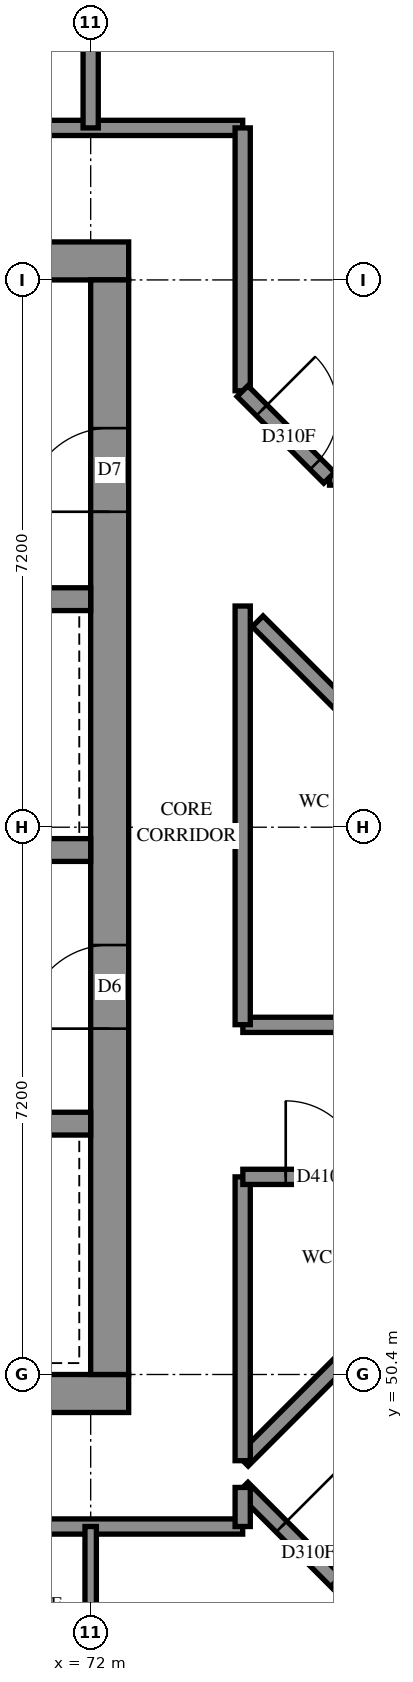
"""IFC4 building model, lengths in metres.
Left out: names, types, materials, properties, quantities, classifications, styles, units other than length and angle.
Written with IfcOpenShell. Run it as: python <this file> out.ifc"""

import sys

from ifc_helpers import new_model, si_unit, direction, frame, frame_2d, origin, place, context, subcontext, project, spatial, rectangle, extrude, element, fill, save


model = new_model("IFC4")
c1 = context("Model", 3, precision=1e-05, world=origin(), true_north=direction((0.0, 1.0)))
c2 = subcontext(c1, "Body", "Model", "MODEL_VIEW")
j1 = project(units=[si_unit("LENGTHUNIT", "METRE"), si_unit("PLANEANGLEUNIT", "RADIAN")], contexts=[c1])
p1 = place(None, origin())
s1 = spatial("IfcSite", under=j1, at=p1, CompositionType="ELEMENT")
p2 = place(p1, origin())
s2 = spatial("IfcBuilding", under=s1, at=p2, CompositionType="ELEMENT")
p3 = place(p2, frame((0.0, 0.0, 196.4)))
s3 = spatial("IfcBuildingStorey", under=s2, at=p3, CompositionType="ELEMENT", Elevation=196.4)
p4 = place(p3, frame((57.1, 50.15, -0.3), z_axis=(0.0, 0.0, 1.0), x_axis=(1.0, 0.0, 0.0)))
e1 = element("IfcWall", 1, at=p4, inside=s3, PredefinedType="SHEAR", context=c2, shape_type="SweptSolid", body=[
    extrude(rectangle(XDim=15.4, YDim=0.5, at=frame_2d((7.7, 0.0))), origin(), (0.0, 0.0, 1.0), 2.7),
])
p5 = place(p3, frame((57.1, 65.05, -0.3), z_axis=(0.0, 0.0, 1.0), x_axis=(1.0, 0.0, 0.0)))
e2 = element("IfcWall", 2, at=p5, inside=s3, PredefinedType="SHEAR", context=c2, shape_type="SweptSolid", body=[
    extrude(rectangle(XDim=15.4, YDim=0.5, at=frame_2d((7.7, 0.0))), origin(), (0.0, 0.0, 1.0), 2.7),
])
p6 = place(p5, frame((10.5, 0.0, 0.3)))
e3 = element("IfcOpeningElement", 3, at=p6, cuts=e2, PredefinedType="OPENING", context=c2, shape_type="SweptSolid", body=[
    extrude(rectangle(XDim=0.8, YDim=2.1, at=frame_2d((0.4, 1.05))), frame((0.0, 0.26, 0.0), z_axis=(0.0, -1.0, 0.0), x_axis=(1.0, 0.0, 0.0)), (0.0, 0.0, 1.0), 0.52),
])
p7 = place(p3, frame((72.25, 50.4, -0.3), z_axis=(0.0, 0.0, 1.0), x_axis=(0.0, 1.0, 0.0)))
e4 = element("IfcWall", 4, at=p7, inside=s3, PredefinedType="SHEAR", context=c2, shape_type="SweptSolid", body=[
    extrude(rectangle(XDim=14.4, YDim=0.5, at=frame_2d((7.2, 0.0))), origin(), (0.0, 0.0, 1.0), 2.7),
])
p8 = place(p7, frame((4.55, 0.0, 0.3)))
e5 = element("IfcOpeningElement", 5, at=p8, cuts=e4, PredefinedType="OPENING", context=c2, shape_type="SweptSolid", body=[
    extrude(rectangle(XDim=1.1, YDim=2.1, at=frame_2d((0.55, 1.05))), frame((0.0, 0.26, 0.0), z_axis=(0.0, -1.0, 0.0), x_axis=(1.0, 0.0, 0.0)), (0.0, 0.0, 1.0), 0.52),
])
p9 = place(p7, frame((11.35, 0.0, 0.3)))
e6 = element("IfcOpeningElement", 6, at=p9, cuts=e4, PredefinedType="OPENING", context=c2, shape_type="SweptSolid", body=[
    extrude(rectangle(XDim=1.1, YDim=2.1, at=frame_2d((0.55, 1.05))), frame((0.0, 0.26, 0.0), z_axis=(0.0, -1.0, 0.0), x_axis=(1.0, 0.0, 0.0)), (0.0, 0.0, 1.0), 0.52),
])
p10 = place(p3, frame((57.6, 53.7, 0.0), z_axis=(0.0, 0.0, 1.0), x_axis=(1.0, 0.0, 0.0)))
e7 = element("IfcWall", 7, at=p10, inside=s3, PredefinedType="SOLIDWALL", context=c2, shape_type="SweptSolid", body=[
    extrude(rectangle(XDim=14.4, YDim=0.3, at=frame_2d((7.2, 0.0))), origin(), (0.0, 0.0, 1.0), 3.1),
])
p11 = place(p10, frame((1.35, 0.0, 0.0)))
e8 = element("IfcOpeningElement", 8, at=p11, cuts=e7, PredefinedType="OPENING", context=c2, shape_type="SweptSolid", body=[
    extrude(rectangle(XDim=0.9, YDim=2.1, at=frame_2d((0.45, 1.05))), frame((0.0, 0.16, 0.0), z_axis=(0.0, -1.0, 0.0), x_axis=(1.0, 0.0, 0.0)), (0.0, 0.0, 1.0), 0.32),
])
p12 = place(p10, frame((4.95, 0.0, 0.0)))
e9 = element("IfcOpeningElement", 9, at=p12, cuts=e7, PredefinedType="OPENING", context=c2, shape_type="SweptSolid", body=[
    extrude(rectangle(XDim=0.9, YDim=2.1, at=frame_2d((0.45, 1.05))), frame((0.0, 0.16, 0.0), z_axis=(0.0, -1.0, 0.0), x_axis=(1.0, 0.0, 0.0)), (0.0, 0.0, 1.0), 0.32),
])
p13 = place(p10, frame((8.55, 0.0, 0.0)))
e10 = element("IfcOpeningElement", 10, at=p13, cuts=e7, PredefinedType="OPENING", context=c2, shape_type="SweptSolid", body=[
    extrude(rectangle(XDim=0.9, YDim=2.1, at=frame_2d((0.45, 1.05))), frame((0.0, 0.16, 0.0), z_axis=(0.0, -1.0, 0.0), x_axis=(1.0, 0.0, 0.0)), (0.0, 0.0, 1.0), 0.32),
])
p14 = place(p10, frame((12.05, 0.0, 0.0)))
e11 = element("IfcOpeningElement", 11, at=p14, cuts=e7, PredefinedType="OPENING", context=c2, shape_type="SweptSolid", body=[
    extrude(rectangle(XDim=1.1, YDim=2.1, at=frame_2d((0.55, 1.05))), frame((0.0, 0.16, 0.0), z_axis=(0.0, -1.0, 0.0), x_axis=(1.0, 0.0, 0.0)), (0.0, 0.0, 1.0), 0.32),
])
p15 = place(p3, frame((57.6, 57.3, 0.0), z_axis=(0.0, 0.0, 1.0), x_axis=(1.0, 0.0, 0.0)))
e12 = element("IfcWall", 12, at=p15, inside=s3, PredefinedType="SOLIDWALL", context=c2, shape_type="SweptSolid", body=[
    extrude(rectangle(XDim=14.4, YDim=0.3, at=frame_2d((7.2, 0.0))), origin(), (0.0, 0.0, 1.0), 3.1),
])
p16 = place(p15, frame((1.25, 0.0, 0.0)))
e13 = element("IfcOpeningElement", 13, at=p16, cuts=e12, PredefinedType="OPENING", context=c2, shape_type="SweptSolid", body=[
    extrude(rectangle(XDim=1.1, YDim=2.1, at=frame_2d((0.55, 1.05))), frame((0.0, 0.16, 0.0), z_axis=(0.0, -1.0, 0.0), x_axis=(1.0, 0.0, 0.0)), (0.0, 0.0, 1.0), 0.32),
])
p17 = place(p15, frame((4.85, 0.0, 0.0)))
e14 = element("IfcOpeningElement", 14, at=p17, cuts=e12, PredefinedType="OPENING", context=c2, shape_type="SweptSolid", body=[
    extrude(rectangle(XDim=1.1, YDim=2.1, at=frame_2d((0.55, 1.05))), frame((0.0, 0.16, 0.0), z_axis=(0.0, -1.0, 0.0), x_axis=(1.0, 0.0, 0.0)), (0.0, 0.0, 1.0), 0.32),
])
p18 = place(p15, frame((8.45, 0.0, 0.0)))
e15 = element("IfcOpeningElement", 15, at=p18, cuts=e12, PredefinedType="OPENING", context=c2, shape_type="SweptSolid", body=[
    extrude(rectangle(XDim=1.1, YDim=2.1, at=frame_2d((0.55, 1.05))), frame((0.0, 0.16, 0.0), z_axis=(0.0, -1.0, 0.0), x_axis=(1.0, 0.0, 0.0)), (0.0, 0.0, 1.0), 0.32),
])
p19 = place(p15, frame((12.05, 0.0, 0.0)))
e16 = element("IfcOpeningElement", 16, at=p19, cuts=e12, PredefinedType="OPENING", context=c2, shape_type="SweptSolid", body=[
    extrude(rectangle(XDim=1.1, YDim=2.1, at=frame_2d((0.55, 1.05))), frame((0.0, 0.16, 0.0), z_axis=(0.0, -1.0, 0.0), x_axis=(1.0, 0.0, 0.0)), (0.0, 0.0, 1.0), 0.32),
])
p20 = place(p3, frame((64.8, 60.6, 0.0), z_axis=(0.0, 0.0, 1.0), x_axis=(1.0, 0.0, 0.0)))
e17 = element("IfcWall", 17, at=p20, inside=s3, PredefinedType="SOLIDWALL", context=c2, shape_type="SweptSolid", body=[
    extrude(rectangle(XDim=7.2, YDim=0.3, at=frame_2d((3.6, 0.0))), origin(), (0.0, 0.0, 1.0), 3.1),
])
p21 = place(p3, frame((55.6, 48.4, 0.0), z_axis=(0.0, 0.0, 1.0), x_axis=(1.0, 0.0, 0.0)))
e18 = element("IfcWall", 18, at=p21, inside=s3, PredefinedType="PARTITIONING", context=c2, shape_type="SweptSolid", body=[
    extrude(rectangle(XDim=18.4, YDim=0.2, at=frame_2d((9.2, 0.0))), origin(), (0.0, 0.0, 1.0), 3.1),
])
p22 = place(p21, frame((5.862, 0.0, 0.0)))
e19 = element("IfcOpeningElement", 19, at=p22, cuts=e18, PredefinedType="OPENING", context=c2, shape_type="SweptSolid", body=[
    extrude(rectangle(XDim=1.0, YDim=2.1, at=frame_2d((0.5, 1.05))), frame((0.0, 0.11, 0.0), z_axis=(0.0, -1.0, 0.0), x_axis=(1.0, 0.0, 0.0)), (0.0, 0.0, 1.0), 0.22),
])
p23 = place(p21, frame((11.5, 0.0, 0.0)))
e20 = element("IfcOpeningElement", 20, at=p23, cuts=e18, PredefinedType="OPENING", context=c2, shape_type="SweptSolid", body=[
    extrude(rectangle(XDim=0.9, YDim=2.1, at=frame_2d((0.45, 1.05))), frame((0.0, 0.11, 0.0), z_axis=(0.0, -1.0, 0.0), x_axis=(1.0, 0.0, 0.0)), (0.0, 0.0, 1.0), 0.22),
])
p24 = place(p21, frame((13.2, 0.0, 0.0)))
e21 = element("IfcOpeningElement", 21, at=p24, cuts=e18, PredefinedType="OPENING", context=c2, shape_type="SweptSolid", body=[
    extrude(rectangle(XDim=0.9, YDim=2.1, at=frame_2d((0.45, 1.05))), frame((0.0, 0.11, 0.0), z_axis=(0.0, -1.0, 0.0), x_axis=(1.0, 0.0, 0.0)), (0.0, 0.0, 1.0), 0.22),
])
p25 = place(p3, frame((55.6, 66.8, 0.0), z_axis=(0.0, 0.0, 1.0), x_axis=(1.0, 0.0, 0.0)))
e22 = element("IfcWall", 22, at=p25, inside=s3, PredefinedType="PARTITIONING", context=c2, shape_type="SweptSolid", body=[
    extrude(rectangle(XDim=18.4, YDim=0.2, at=frame_2d((9.2, 0.0))), origin(), (0.0, 0.0, 1.0), 3.1),
])
p26 = place(p25, frame((5.886, 0.0, 0.0)))
e23 = element("IfcOpeningElement", 23, at=p26, cuts=e22, PredefinedType="OPENING", context=c2, shape_type="SweptSolid", body=[
    extrude(rectangle(XDim=1.0, YDim=2.1, at=frame_2d((0.5, 1.05))), frame((0.0, 0.11, 0.0), z_axis=(0.0, -1.0, 0.0), x_axis=(1.0, 0.0, 0.0)), (0.0, 0.0, 1.0), 0.22),
])
p27 = place(p25, frame((13.389, 0.0, 0.0)))
e24 = element("IfcOpeningElement", 24, at=p27, cuts=e22, PredefinedType="OPENING", context=c2, shape_type="SweptSolid", body=[
    extrude(rectangle(XDim=1.0, YDim=2.1, at=frame_2d((0.5, 1.05))), frame((0.0, 0.11, 0.0), z_axis=(0.0, -1.0, 0.0), x_axis=(1.0, 0.0, 0.0)), (0.0, 0.0, 1.0), 0.22),
])
p28 = place(p3, frame((73.999, 48.911, 0.0), z_axis=(0.0, 0.0, 1.0), x_axis=(0.7071067812, -0.7071067812, 0.0)))
e25 = element("IfcWall", 25, at=p28, inside=s3, PredefinedType="PARTITIONING", context=c2, shape_type="SweptSolid", body=[
    extrude(rectangle(XDim=5.745, YDim=0.2, at=frame_2d((2.872, 0.0))), origin(), (0.0, 0.0, 1.0), 3.1),
])
p29 = place(p28, frame((0.724, 0.0, 0.0)))
e26 = element("IfcOpeningElement", 26, at=p29, cuts=e25, PredefinedType="OPENING", context=c2, shape_type="SweptSolid", body=[
    extrude(rectangle(XDim=1.0, YDim=2.1, at=frame_2d((0.5, 1.05))), frame((0.0, 0.11, 0.0), z_axis=(0.0, -1.0, 0.0), x_axis=(1.0, 0.0, 0.0)), (0.0, 0.0, 1.0), 0.22),
])
p30 = place(p3, frame((74.002, 55.0, 0.0), z_axis=(0.0, 0.0, 1.0), x_axis=(1.0, 0.0, 0.0)))
e27 = element("IfcWall", 27, at=p30, inside=s3, PredefinedType="PARTITIONING", context=c2, shape_type="SweptSolid", body=[
    extrude(rectangle(XDim=5.508, YDim=0.2, at=frame_2d((2.754, 0.0))), origin(), (0.0, 0.0, 1.0), 3.1),
])
p31 = place(p30, frame((1.51, 0.0, 0.0)))
e28 = element("IfcOpeningElement", 28, at=p31, cuts=e27, PredefinedType="OPENING", context=c2, shape_type="SweptSolid", body=[
    extrude(rectangle(XDim=1.0, YDim=2.1, at=frame_2d((0.5, 1.05))), frame((0.0, 0.11, 0.0), z_axis=(0.0, -1.0, 0.0), x_axis=(1.0, 0.0, 0.0)), (0.0, 0.0, 1.0), 0.22),
])
p32 = place(p3, frame((74.0, 55.002, 0.0), z_axis=(0.0, 0.0, 1.0), x_axis=(0.0, 1.0, 0.0)))
e29 = element("IfcWall", 29, at=p32, inside=s3, PredefinedType="PARTITIONING", context=c2, shape_type="SweptSolid", body=[
    extrude(rectangle(XDim=5.508, YDim=0.2, at=frame_2d((2.754, 0.0))), origin(), (0.0, 0.0, 1.0), 3.1),
])
p33 = place(p3, frame((74.001, 49.267, 0.0), z_axis=(0.0, 0.0, 1.0), x_axis=(0.7071067812, 0.7071067812, 0.0)))
e30 = element("IfcWall", 30, at=p33, inside=s3, PredefinedType="PARTITIONING", context=c2, shape_type="SweptSolid", body=[
    extrude(rectangle(XDim=5.278, YDim=0.2, at=frame_2d((2.639, 0.0))), origin(), (0.0, 0.0, 1.0), 3.1),
])
p34 = place(p3, frame((74.197, 60.309, 0.0), z_axis=(0.0, 0.0, 1.0), x_axis=(0.7071067812, -0.7071067812, 0.0)))
e31 = element("IfcWall", 31, at=p34, inside=s3, PredefinedType="PARTITIONING", context=c2, shape_type="SweptSolid", body=[
    extrude(rectangle(XDim=4.738, YDim=0.2, at=frame_2d((2.369, 0.0))), origin(), (0.0, 0.0, 1.0), 3.1),
])
p35 = place(p3, frame((72.0, 66.8, 0.0), z_axis=(0.0, 0.0, 1.0), x_axis=(0.0, 1.0, 0.0)))
e32 = element("IfcWall", 32, at=p35, inside=s3, PredefinedType="PARTITIONING", context=c2, shape_type="SweptSolid", body=[
    extrude(rectangle(XDim=4.696, YDim=0.2, at=frame_2d((2.348, 0.0))), origin(), (0.0, 0.0, 1.0), 3.1),
])
p36 = place(p3, frame((75.142, 62.2, 0.0), z_axis=(0.0, 0.0, 1.0), x_axis=(1.0, 0.0, 0.0)))
e33 = element("IfcWall", 33, at=p36, inside=s3, PredefinedType="PARTITIONING", context=c2, shape_type="SweptSolid", body=[
    extrude(rectangle(XDim=4.058, YDim=0.2, at=frame_2d((2.029, 0.0))), origin(), (0.0, 0.0, 1.0), 3.1),
])
p37 = place(p36, frame((2.808, 0.0, 0.0)))
e34 = element("IfcOpeningElement", 34, at=p37, cuts=e33, PredefinedType="OPENING", context=c2, shape_type="SweptSolid", body=[
    extrude(rectangle(XDim=0.9, YDim=2.1, at=frame_2d((0.45, 1.05))), frame((0.0, 0.11, 0.0), z_axis=(0.0, -1.0, 0.0), x_axis=(1.0, 0.0, 0.0)), (0.0, 0.0, 1.0), 0.22),
])
p38 = place(p3, frame((74.0, 49.266, 0.0), z_axis=(0.0, 0.0, 1.0), x_axis=(0.0, 1.0, 0.0)))
e35 = element("IfcWall", 35, at=p38, inside=s3, PredefinedType="PARTITIONING", context=c2, shape_type="SweptSolid", body=[
    extrude(rectangle(XDim=3.734, YDim=0.2, at=frame_2d((1.867, 0.0))), origin(), (0.0, 0.0, 1.0), 3.1),
])
p39 = place(p3, frame((74.002, 53.0, 0.0), z_axis=(0.0, 0.0, 1.0), x_axis=(1.0, 0.0, 0.0)))
e36 = element("IfcWall", 36, at=p39, inside=s3, PredefinedType="PARTITIONING", context=c2, shape_type="SweptSolid", body=[
    extrude(rectangle(XDim=3.732, YDim=0.2, at=frame_2d((1.866, 0.0))), origin(), (0.0, 0.0, 1.0), 3.1),
])
p40 = place(p39, frame((0.564, 0.0, 0.0)))
e37 = element("IfcOpeningElement", 37, at=p40, cuts=e36, PredefinedType="OPENING", context=c2, shape_type="SweptSolid", body=[
    extrude(rectangle(XDim=1.0, YDim=2.1, at=frame_2d((0.5, 1.05))), frame((0.0, 0.11, 0.0), z_axis=(0.0, -1.0, 0.0), x_axis=(1.0, 0.0, 0.0)), (0.0, 0.0, 1.0), 0.22),
])
p41 = place(p3, frame((74.0, 63.342, 0.0), z_axis=(0.0, 0.0, 1.0), x_axis=(0.0, 1.0, 0.0)))
e38 = element("IfcWall", 38, at=p41, inside=s3, PredefinedType="PARTITIONING", context=c2, shape_type="SweptSolid", body=[
    extrude(rectangle(XDim=3.458, YDim=0.2, at=frame_2d((1.729, 0.0))), origin(), (0.0, 0.0, 1.0), 3.1),
])
p42 = place(p3, frame((72.0, 46.0, 0.0), z_axis=(0.0, 0.0, 1.0), x_axis=(0.0, 1.0, 0.0)))
e39 = element("IfcWall", 39, at=p42, inside=s3, PredefinedType="PARTITIONING", context=c2, shape_type="SweptSolid", body=[
    extrude(rectangle(XDim=2.4, YDim=0.15, at=frame_2d((1.2, 0.0))), origin(), (0.0, 0.0, 1.0), 3.1),
])
p43 = place(p3, frame((73.997, 63.337, 0.0), z_axis=(0.0, 0.0, 1.0), x_axis=(0.7071067812, -0.7071067812, 0.0)))
e40 = element("IfcWall", 40, at=p43, inside=s3, PredefinedType="PARTITIONING", context=c2, shape_type="SweptSolid", body=[
    extrude(rectangle(XDim=1.612, YDim=0.2, at=frame_2d((0.806, 0.0))), origin(), (0.0, 0.0, 1.0), 3.1),
])
p44 = place(p43, frame((0.357, 0.0, 0.0)))
e41 = element("IfcOpeningElement", 41, at=p44, cuts=e40, PredefinedType="OPENING", context=c2, shape_type="SweptSolid", body=[
    extrude(rectangle(XDim=1.0, YDim=2.1, at=frame_2d((0.5, 1.05))), frame((0.0, 0.11, 0.0), z_axis=(0.0, -1.0, 0.0), x_axis=(1.0, 0.0, 0.0)), (0.0, 0.0, 1.0), 0.22),
])
p45 = place(p3, frame((74.0, 48.4, 0.0), z_axis=(0.0, 0.0, 1.0), x_axis=(0.0, 1.0, 0.0)))
e42 = element("IfcWall", 42, at=p45, inside=s3, PredefinedType="PARTITIONING", context=c2, shape_type="SweptSolid", body=[
    extrude(rectangle(XDim=0.514, YDim=0.2, at=frame_2d((0.257, 0.0))), origin(), (0.0, 0.0, 1.0), 3.1),
])
p46 = place(p8, origin())
e43 = element("IfcDoor", 43, at=p46, inside=s3, OperationType="DOUBLE_DOOR_SINGLE_SWING", PredefinedType="DOOR", context=c2, shape_type="SweptSolid", body=[
    extrude(rectangle(XDim=1.1, YDim=2.1, at=frame_2d((0.55, 1.05))), frame((0.0, 0.025, 0.0), z_axis=(0.0, -1.0, 0.0), x_axis=(1.0, 0.0, 0.0)), (0.0, 0.0, 1.0), 0.05),
])
fill(e5, e43)
p47 = place(p9, origin())
e44 = element("IfcDoor", 44, at=p47, inside=s3, OperationType="SINGLE_SWING_RIGHT", PredefinedType="DOOR", context=c2, shape_type="SweptSolid", body=[
    extrude(rectangle(XDim=1.1, YDim=2.1, at=frame_2d((0.55, 1.05))), frame((0.0, 0.025, 0.0), z_axis=(0.0, -1.0, 0.0), x_axis=(1.0, 0.0, 0.0)), (0.0, 0.0, 1.0), 0.05),
])
fill(e6, e44)
p48 = place(p40, origin())
e45 = element("IfcDoor", 45, at=p48, inside=s3, OperationType="SINGLE_SWING_RIGHT", PredefinedType="DOOR", context=c2, shape_type="SweptSolid", body=[
    extrude(rectangle(XDim=1.0, YDim=2.1, at=frame_2d((0.5, 1.05))), frame((0.0, 0.025, 0.0), z_axis=(0.0, -1.0, 0.0), x_axis=(1.0, 0.0, 0.0)), (0.0, 0.0, 1.0), 0.05),
])
fill(e37, e45)
p49 = place(p44, origin())
e46 = element("IfcDoor", 46, at=p49, inside=s3, OperationType="SINGLE_SWING_RIGHT", PredefinedType="DOOR", context=c2, shape_type="SweptSolid", body=[
    extrude(rectangle(XDim=1.0, YDim=2.1, at=frame_2d((0.5, 1.05))), frame((0.0, 0.025, 0.0), z_axis=(0.0, -1.0, 0.0), x_axis=(1.0, 0.0, 0.0)), (0.0, 0.0, 1.0), 0.05),
])
fill(e41, e46)
p50 = place(p29, origin())
e47 = element("IfcDoor", 47, at=p50, inside=s3, OperationType="SINGLE_SWING_LEFT", PredefinedType="DOOR", context=c2, shape_type="SweptSolid", body=[
    extrude(rectangle(XDim=1.0, YDim=2.1, at=frame_2d((0.5, 1.05))), frame((0.0, 0.025, 0.0), z_axis=(0.0, -1.0, 0.0), x_axis=(1.0, 0.0, 0.0)), (0.0, 0.0, 1.0), 0.05),
])
fill(e26, e47)
save(model, sys.argv[1])
